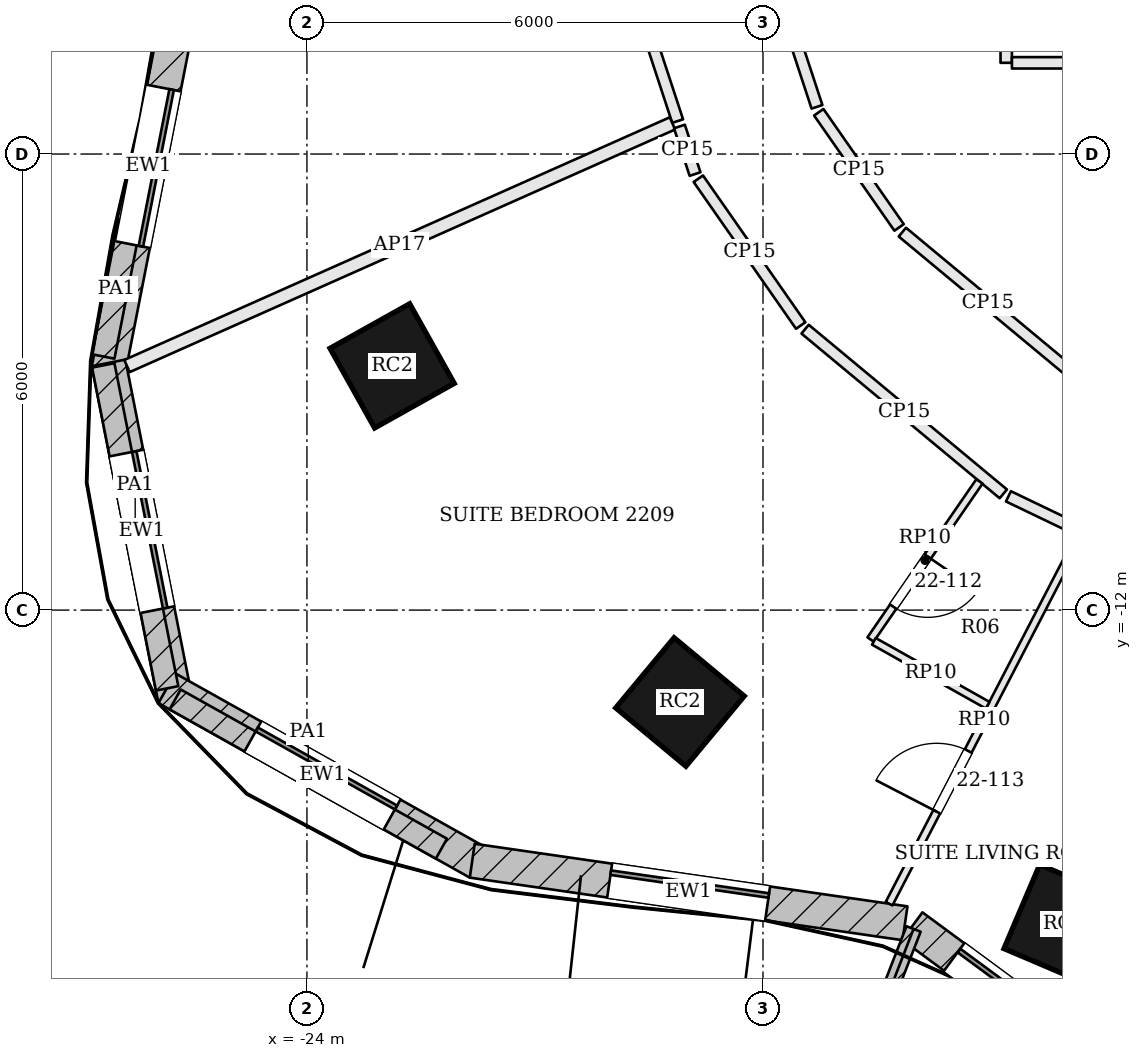
"""IFC4 building model, lengths in metres.
Left out: names, types, materials, properties, quantities, classifications, styles, units other than length and angle.
Written with IfcOpenShell. Run it as: python <this file> out.ifc"""

import sys

from ifc_helpers import new_model, si_unit, direction, frame, frame_2d, origin, origin_2d, place, context, subcontext, project, spatial, rectangle, extrude, element, fill, save


model = new_model("IFC4")
c1 = context("Model", 3, precision=1e-05, world=origin(), true_north=direction((0.0, 1.0)))
c2 = subcontext(c1, "Body", "Model", "MODEL_VIEW")
j1 = project(units=[si_unit("LENGTHUNIT", "METRE"), si_unit("PLANEANGLEUNIT", "RADIAN")], contexts=[c1])
p1 = place(None, origin())
s1 = spatial("IfcSite", under=j1, at=p1, CompositionType="ELEMENT")
p2 = place(p1, origin())
s2 = spatial("IfcBuilding", under=s1, at=p2, CompositionType="ELEMENT")
p3 = place(p2, frame((0.0, 0.0, 96.0)))
s3 = spatial("IfcBuildingStorey", under=s2, at=p3, CompositionType="ELEMENT", Elevation=96.0)
for number, where, z_axis, x_axis in (
    (1, (-22.879, -8.787, 0.0), (0.0, 0.0, 1.0), (0.489, -0.873, 0.0)),
    (2, (-19.092, -13.209, 0.0), (0.0, 0.0, 1.0), (0.769, -0.639, 0.0)),
    (3, (-14.042, -16.136, 0.0), (0.0, 0.0, 1.0), (0.92, -0.392, 0.0)),
):
    element("IfcColumn", number, at=place(p3, frame(where, z_axis=z_axis, x_axis=x_axis)), inside=s3, PredefinedType="COLUMN", context=c2, shape_type="SweptSolid", body=[
        extrude(rectangle(XDim=1.2, YDim=1.2, at=origin_2d()), origin(), (0.0, 0.0, 1.0), 3.6),
    ])
p4 = place(p3, frame((-25.561, -3.49, 0.0), z_axis=(0.0, 0.0, 1.0), x_axis=(-0.192494026297, -0.981298145234, 0.0)))
e4 = element("IfcWall", 4, at=p4, inside=s3, PredefinedType="SOLIDWALL", context=c2, shape_type="SweptSolid", body=[
    extrude(rectangle(XDim=5.446, YDim=0.45, at=frame_2d((2.723, 0.0))), origin(), (0.0, 0.0, 1.0), 3.4),
])
p5 = place(p4, frame((1.673, 0.0, 0.9)))
e5 = element("IfcOpeningElement", 5, at=p5, cuts=e4, PredefinedType="OPENING", context=c2, shape_type="SweptSolid", body=[
    extrude(rectangle(XDim=2.1, YDim=2.0, at=frame_2d((1.05, 1.0))), frame((0.0, 0.235, 0.0), z_axis=(0.0, -1.0, 0.0), x_axis=(1.0, 0.0, 0.0)), (0.0, 0.0, 1.0), 0.47),
])
p6 = place(p3, frame((-26.61, -8.748, 0.0), z_axis=(0.0, 0.0, 1.0), x_axis=(0.193923166402, -0.981016720312, 0.0)))
e6 = element("IfcWall", 6, at=p6, inside=s3, PredefinedType="SOLIDWALL", context=c2, shape_type="SweptSolid", body=[
    extrude(rectangle(XDim=4.518, YDim=0.45, at=frame_2d((2.259, 0.0))), origin(), (0.0, 0.0, 1.0), 3.4),
])
p7 = place(p6, frame((1.209, 0.0, 0.9)))
e7 = element("IfcOpeningElement", 7, at=p7, cuts=e6, PredefinedType="OPENING", context=c2, shape_type="SweptSolid", body=[
    extrude(rectangle(XDim=2.1, YDim=2.0, at=frame_2d((1.05, 1.0))), frame((0.0, 0.235, 0.0), z_axis=(0.0, -1.0, 0.0), x_axis=(1.0, 0.0, 0.0)), (0.0, 0.0, 1.0), 0.47),
])
p8 = place(p3, frame((-25.844, -13.028, 0.0), z_axis=(0.0, 0.0, 1.0), x_axis=(0.872346398261, -0.488888291373, 0.0)))
e8 = element("IfcWall", 8, at=p8, inside=s3, PredefinedType="SOLIDWALL", context=c2, shape_type="SweptSolid", body=[
    extrude(rectangle(XDim=4.696, YDim=0.45, at=frame_2d((2.348, 0.0))), origin(), (0.0, 0.0, 1.0), 3.4),
])
p9 = place(p8, frame((1.298, 0.0, 0.9)))
e9 = element("IfcOpeningElement", 9, at=p9, cuts=e8, PredefinedType="OPENING", context=c2, shape_type="SweptSolid", body=[
    extrude(rectangle(XDim=2.1, YDim=2.0, at=frame_2d((1.05, 1.0))), frame((0.0, 0.235, 0.0), z_axis=(0.0, -1.0, 0.0), x_axis=(1.0, 0.0, 0.0)), (0.0, 0.0, 1.0), 0.47),
])
p10 = place(p3, frame((-21.825, -15.297, 0.0), z_axis=(0.0, 0.0, 1.0), x_axis=(0.98971474215, -0.143054986527, 0.0)))
e10 = element("IfcWall", 10, at=p10, inside=s3, PredefinedType="SOLIDWALL", context=c2, shape_type="SweptSolid", body=[
    extrude(rectangle(XDim=5.753, YDim=0.45, at=frame_2d((2.876, 0.0))), origin(), (0.0, 0.0, 1.0), 3.4),
])
p11 = place(p10, frame((1.826, 0.0, 0.9)))
e11 = element("IfcOpeningElement", 11, at=p11, cuts=e10, PredefinedType="OPENING", context=c2, shape_type="SweptSolid", body=[
    extrude(rectangle(XDim=2.1, YDim=2.0, at=frame_2d((1.05, 1.0))), frame((0.0, 0.235, 0.0), z_axis=(0.0, -1.0, 0.0), x_axis=(1.0, 0.0, 0.0)), (0.0, 0.0, 1.0), 0.47),
])
p12 = place(p3, frame((-16.036, -16.158, 0.0), z_axis=(0.0, 0.0, 1.0), x_axis=(0.805181432967, -0.593028549064, 0.0)))
e12 = element("IfcWall", 12, at=p12, inside=s3, PredefinedType="SOLIDWALL", context=c2, shape_type="SweptSolid", body=[
    extrude(rectangle(XDim=3.469, YDim=0.45, at=frame_2d((1.734, 0.0))), origin(), (0.0, 0.0, 1.0), 3.4),
])
p13 = place(p12, frame((0.684, 0.0, 0.9)))
e13 = element("IfcOpeningElement", 13, at=p13, cuts=e12, PredefinedType="OPENING", context=c2, shape_type="SweptSolid", body=[
    extrude(rectangle(XDim=2.1, YDim=2.0, at=frame_2d((1.05, 1.0))), frame((0.0, 0.235, 0.0), z_axis=(0.0, -1.0, 0.0), x_axis=(1.0, 0.0, 0.0)), (0.0, 0.0, 1.0), 0.47),
])
p14 = place(p3, frame((-16.019, -16.195, 0.0), z_axis=(0.0, 0.0, 1.0), x_axis=(-0.362641522028, -0.931928713208, 0.0)))
e14 = element("IfcWall", 14, at=p14, inside=s3, PredefinedType="SOLIDWALL", context=c2, shape_type="SweptSolid", body=[
    extrude(rectangle(XDim=1.75, YDim=0.2, at=frame_2d((0.875, 0.0))), origin(), (0.0, 0.0, 1.0), 3.4),
])
p15 = place(p3, frame((-26.332, -6.889, 3.6), z_axis=(0.0, 0.0, 1.0), x_axis=(-0.192480725658, -0.981300754229, 0.0)))
e15 = element("IfcWall", 15, at=p15, inside=s3, PredefinedType="PARAPET", context=c2, shape_type="SweptSolid", body=[
    extrude(rectangle(XDim=1.809, YDim=0.3, at=frame_2d((0.904, 0.0))), origin(), (0.0, 0.0, 1.0), 1.1),
])
p16 = place(p3, frame((-26.68, -8.78, 3.6), z_axis=(0.0, 0.0, 1.0), x_axis=(0.193937094138, -0.981013967035, 0.0)))
e16 = element("IfcWall", 16, at=p16, inside=s3, PredefinedType="PARAPET", context=c2, shape_type="SweptSolid", body=[
    extrude(rectangle(XDim=4.332, YDim=0.3, at=frame_2d((2.166, 0.0))), origin(), (0.0, 0.0, 1.0), 1.1),
])
p17 = place(p3, frame((-25.734, -13.176, 3.6), z_axis=(0.0, 0.0, 1.0), x_axis=(0.872347343965, -0.488886603905, 0.0)))
e17 = element("IfcWall", 17, at=p17, inside=s3, PredefinedType="PARAPET", context=c2, shape_type="SweptSolid", body=[
    extrude(rectangle(XDim=4.016, YDim=0.3, at=frame_2d((2.008, 0.0))), origin(), (0.0, 0.0, 1.0), 1.1),
])
p18 = place(p3, frame((-19.914, -3.157, 0.0), z_axis=(0.0, 0.0, 1.0), x_axis=(0.312037873477, -0.950069663507, 0.0)))
e18 = element("IfcWall", 18, at=p18, inside=s3, PredefinedType="PARTITIONING", context=c2, shape_type="SweptSolid", body=[
    extrude(rectangle(XDim=2.537, YDim=0.15, at=frame_2d((1.268, 0.0))), origin(), (0.0, 0.0, 1.0), 2.784),
])
p19 = place(p3, frame((-26.367, -8.789, 0.0), z_axis=(0.0, 0.0, 1.0), x_axis=(0.913674334345, 0.406447057756, 0.0)))
e19 = element("IfcWall", 19, at=p19, inside=s3, PredefinedType="PARTITIONING", context=c2, shape_type="SweptSolid", body=[
    extrude(rectangle(XDim=7.854, YDim=0.175, at=frame_2d((3.927, 0.0))), origin(), (0.0, 0.0, 1.0), 2.784),
])
p20 = place(p3, frame((-19.099, -5.638, 0.0), z_axis=(0.0, 0.0, 1.0), x_axis=(0.312220223489, -0.950009753657, 0.0)))
e20 = element("IfcWall", 20, at=p20, inside=s3, PredefinedType="PARTITIONING", context=c2, shape_type="SweptSolid", body=[
    extrude(rectangle(XDim=0.658, YDim=0.15, at=frame_2d((0.329, 0.0))), origin(), (0.0, 0.0, 1.0), 2.784),
])
p21 = place(p3, frame((-18.851, -6.325, 0.0), z_axis=(0.0, 0.0, 1.0), x_axis=(0.572090775968, -0.820190309656, 0.0)))
e21 = element("IfcWall", 21, at=p21, inside=s3, PredefinedType="PARTITIONING", context=c2, shape_type="SweptSolid", body=[
    extrude(rectangle(XDim=2.355, YDim=0.15, at=frame_2d((1.177, 0.0))), origin(), (0.0, 0.0, 1.0), 2.784),
])
p22 = place(p3, frame((-17.446, -8.304, 0.0), z_axis=(0.0, 0.0, 1.0), x_axis=(0.769200174495, -0.639007896318, 0.0)))
e22 = element("IfcWall", 22, at=p22, inside=s3, PredefinedType="PARTITIONING", context=c2, shape_type="SweptSolid", body=[
    extrude(rectangle(XDim=3.39, YDim=0.15, at=frame_2d((1.695, 0.0))), origin(), (0.0, 0.0, 1.0), 2.784),
])
p23 = place(p3, frame((-14.771, -10.503, 0.0), z_axis=(0.0, 0.0, 1.0), x_axis=(0.901503349553, -0.432772123346, 0.0)))
e23 = element("IfcWall", 23, at=p23, inside=s3, PredefinedType="PARTITIONING", context=c2, shape_type="SweptSolid", body=[
    extrude(rectangle(XDim=3.673, YDim=0.15, at=frame_2d((1.836, 0.0))), origin(), (0.0, 0.0, 1.0), 2.784),
])
p24 = place(p23, frame((2.092, 0.0, 0.0)))
e24 = element("IfcOpeningElement", 24, at=p24, cuts=e23, PredefinedType="OPENING", context=c2, shape_type="SweptSolid", body=[
    extrude(rectangle(XDim=1.0, YDim=2.1, at=frame_2d((0.5, 1.05))), frame((0.0, 0.085, 0.0), z_axis=(0.0, -1.0, 0.0), x_axis=(1.0, 0.0, 0.0)), (0.0, 0.0, 1.0), 0.17),
])
p25 = place(p3, frame((-13.917, -8.896, 0.0), z_axis=(0.0, 0.0, 1.0), x_axis=(-0.769130409479, 0.639091866021, 0.0)))
e25 = element("IfcWall", 25, at=p25, inside=s3, PredefinedType="PARTITIONING", context=c2, shape_type="SweptSolid", body=[
    extrude(rectangle(XDim=2.925, YDim=0.15, at=frame_2d((1.462, 0.0))), origin(), (0.0, 0.0, 1.0), 2.784),
])
p26 = place(p3, frame((-16.209, -6.966, 0.0), z_axis=(0.0, 0.0, 1.0), x_axis=(-0.572051367607, 0.820217795966, 0.0)))
e26 = element("IfcWall", 26, at=p26, inside=s3, PredefinedType="PARTITIONING", context=c2, shape_type="SweptSolid", body=[
    extrude(rectangle(XDim=1.848, YDim=0.15, at=frame_2d((0.924, 0.0))), origin(), (0.0, 0.0, 1.0), 2.784),
])
p27 = place(p3, frame((-17.29, -5.379, 0.0), z_axis=(0.0, 0.0, 1.0), x_axis=(-0.312009486843, 0.950078986253, 0.0)))
e27 = element("IfcWall", 27, at=p27, inside=s3, PredefinedType="PARTITIONING", context=c2, shape_type="SweptSolid", body=[
    extrude(rectangle(XDim=2.78, YDim=0.15, at=frame_2d((1.39, 0.0))), origin(), (0.0, 0.0, 1.0), 2.784),
])
p28 = place(p3, frame((-14.8, 8.148, 0.0), z_axis=(0.0, 0.0, 1.0), x_axis=(0.0, -1.0, 0.0)))
e28 = element("IfcWall", 28, at=p28, inside=s3, PredefinedType="PARTITIONING", context=c2, shape_type="SweptSolid", body=[
    extrude(rectangle(XDim=12.948, YDim=0.15, at=frame_2d((6.474, 0.0))), origin(), (0.0, 0.0, 1.0), 2.784),
])
p29 = place(p28, frame((5.687, 0.0, 0.0)))
e29 = element("IfcOpeningElement", 29, at=p29, cuts=e28, PredefinedType="OPENING", context=c2, shape_type="SweptSolid", body=[
    extrude(rectangle(XDim=0.7, YDim=2.1, at=frame_2d((0.35, 1.05))), frame((0.0, 0.085, 0.0), z_axis=(0.0, -1.0, 0.0), x_axis=(1.0, 0.0, 0.0)), (0.0, 0.0, 1.0), 0.17),
])
p30 = place(p3, frame((-14.725, -4.8, 0.0), z_axis=(0.0, 0.0, 1.0), x_axis=(1.0, 0.0, 0.0)))
e30 = element("IfcWall", 30, at=p30, inside=s3, PredefinedType="PARTITIONING", context=c2, shape_type="SweptSolid", body=[
    extrude(rectangle(XDim=29.525, YDim=0.15, at=frame_2d((14.763, 0.0))), origin(), (0.0, 0.0, 1.0), 2.784),
])
p31 = place(p30, frame((2.075, 0.0, 0.0)))
e31 = element("IfcOpeningElement", 31, at=p31, cuts=e30, PredefinedType="OPENING", context=c2, shape_type="SweptSolid", body=[
    extrude(rectangle(XDim=1.0, YDim=2.1, at=frame_2d((0.5, 1.05))), frame((0.0, 0.085, 0.0), z_axis=(0.0, -1.0, 0.0), x_axis=(1.0, 0.0, 0.0)), (0.0, 0.0, 1.0), 0.17),
])
p32 = place(p30, frame((13.825, 0.0, 0.0)))
e32 = element("IfcOpeningElement", 32, at=p32, cuts=e30, PredefinedType="OPENING", context=c2, shape_type="SweptSolid", body=[
    extrude(rectangle(XDim=1.8, YDim=2.1, at=frame_2d((0.9, 1.05))), frame((0.0, 0.085, 0.0), z_axis=(0.0, -1.0, 0.0), x_axis=(1.0, 0.0, 0.0)), (0.0, 0.0, 1.0), 0.17),
])
p33 = place(p30, frame((26.525, 0.0, 0.0)))
e33 = element("IfcOpeningElement", 33, at=p33, cuts=e30, PredefinedType="OPENING", context=c2, shape_type="SweptSolid", body=[
    extrude(rectangle(XDim=0.7, YDim=2.1, at=frame_2d((0.35, 1.05))), frame((0.0, 0.085, 0.0), z_axis=(0.0, -1.0, 0.0), x_axis=(1.0, 0.0, 0.0)), (0.0, 0.0, 1.0), 0.17),
])
p34 = place(p3, frame((-16.341, -15.862, 0.0), z_axis=(0.0, 0.0, 1.0), x_axis=(0.460149427678, 0.887841485969, 0.0)))
e34 = element("IfcWall", 34, at=p34, inside=s3, PredefinedType="PARTITIONING", context=c2, shape_type="SweptSolid", body=[
    extrude(rectangle(XDim=5.438, YDim=0.1, at=frame_2d((2.719, 0.0))), origin(), (0.0, 0.0, 1.0), 2.884),
])
p35 = place(p34, frame((1.363, 0.0, 0.0)))
e35 = element("IfcOpeningElement", 35, at=p35, cuts=e34, PredefinedType="OPENING", context=c2, shape_type="SweptSolid", body=[
    extrude(rectangle(XDim=0.9, YDim=2.4, at=frame_2d((0.45, 1.2))), frame((0.0, 0.06, 0.0), z_axis=(0.0, -1.0, 0.0), x_axis=(1.0, 0.0, 0.0)), (0.0, 0.0, 1.0), 0.12),
])
p36 = place(p3, frame((-15.152, -10.307, 0.0), z_axis=(0.0, 0.0, 1.0), x_axis=(-0.567242581317, -0.823550759784, 0.0)))
e36 = element("IfcWall", 36, at=p36, inside=s3, PredefinedType="PARTITIONING", context=c2, shape_type="SweptSolid", body=[
    extrude(rectangle(XDim=2.525, YDim=0.1, at=frame_2d((1.263, 0.0))), origin(), (0.0, 0.0, 1.0), 2.884),
])
p37 = place(p36, frame((1.2, 0.0, 0.0)))
e37 = element("IfcOpeningElement", 37, at=p37, cuts=e36, PredefinedType="OPENING", context=c2, shape_type="SweptSolid", body=[
    extrude(rectangle(XDim=0.8, YDim=2.1, at=frame_2d((0.4, 1.05))), frame((0.0, 0.06, 0.0), z_axis=(0.0, -1.0, 0.0), x_axis=(1.0, 0.0, 0.0)), (0.0, 0.0, 1.0), 0.12),
])
p38 = place(p3, frame((-16.541, -12.411, 0.0), z_axis=(0.0, 0.0, 1.0), x_axis=(0.872042364088, -0.489430398765, 0.0)))
e38 = element("IfcWall", 38, at=p38, inside=s3, PredefinedType="PARTITIONING", context=c2, shape_type="SweptSolid", body=[
    extrude(rectangle(XDim=1.717, YDim=0.1, at=frame_2d((0.858, 0.0))), origin(), (0.0, 0.0, 1.0), 2.884),
])
p39 = place(p5, origin())
e39 = element("IfcWindow", 39, at=p39, inside=s3, PartitioningType="SINGLE_PANEL", PredefinedType="WINDOW", context=c2, shape_type="SweptSolid", body=[
    extrude(rectangle(XDim=2.1, YDim=2.0, at=frame_2d((1.05, 1.0))), frame((0.0, 0.135, 0.0), z_axis=(0.0, -1.0, 0.0), x_axis=(1.0, 0.0, 0.0)), (0.0, 0.0, 1.0), 0.06),
])
fill(e5, e39)
p40 = place(p7, origin())
e40 = element("IfcWindow", 40, at=p40, inside=s3, PartitioningType="SINGLE_PANEL", PredefinedType="WINDOW", context=c2, shape_type="SweptSolid", body=[
    extrude(rectangle(XDim=2.1, YDim=2.0, at=frame_2d((1.05, 1.0))), frame((0.0, 0.135, 0.0), z_axis=(0.0, -1.0, 0.0), x_axis=(1.0, 0.0, 0.0)), (0.0, 0.0, 1.0), 0.06),
])
fill(e7, e40)
p41 = place(p9, origin())
e41 = element("IfcWindow", 41, at=p41, inside=s3, PartitioningType="SINGLE_PANEL", PredefinedType="WINDOW", context=c2, shape_type="SweptSolid", body=[
    extrude(rectangle(XDim=2.1, YDim=2.0, at=frame_2d((1.05, 1.0))), frame((0.0, 0.135, 0.0), z_axis=(0.0, -1.0, 0.0), x_axis=(1.0, 0.0, 0.0)), (0.0, 0.0, 1.0), 0.06),
])
fill(e9, e41)
p42 = place(p11, origin())
e42 = element("IfcWindow", 42, at=p42, inside=s3, PartitioningType="SINGLE_PANEL", PredefinedType="WINDOW", context=c2, shape_type="SweptSolid", body=[
    extrude(rectangle(XDim=2.1, YDim=2.0, at=frame_2d((1.05, 1.0))), frame((0.0, 0.135, 0.0), z_axis=(0.0, -1.0, 0.0), x_axis=(1.0, 0.0, 0.0)), (0.0, 0.0, 1.0), 0.06),
])
fill(e11, e42)
p43 = place(p13, origin())
e43 = element("IfcWindow", 43, at=p43, inside=s3, PartitioningType="SINGLE_PANEL", PredefinedType="WINDOW", context=c2, shape_type="SweptSolid", body=[
    extrude(rectangle(XDim=2.1, YDim=2.0, at=frame_2d((1.05, 1.0))), frame((0.0, 0.135, 0.0), z_axis=(0.0, -1.0, 0.0), x_axis=(1.0, 0.0, 0.0)), (0.0, 0.0, 1.0), 0.06),
])
fill(e13, e43)
p44 = place(p37, origin())
e44 = element("IfcDoor", 44, at=p44, inside=s3, OperationType="SINGLE_SWING_LEFT", PredefinedType="DOOR", context=c2, shape_type="SweptSolid", body=[
    extrude(rectangle(XDim=0.8, YDim=2.1, at=frame_2d((0.4, 1.05))), frame((0.0, 0.025, 0.0), z_axis=(0.0, -1.0, 0.0), x_axis=(1.0, 0.0, 0.0)), (0.0, 0.0, 1.0), 0.05),
])
fill(e37, e44)
p45 = place(p35, origin())
e45 = element("IfcDoor", 45, at=p45, inside=s3, OperationType="SINGLE_SWING_LEFT", PredefinedType="DOOR", context=c2, shape_type="SweptSolid", body=[
    extrude(rectangle(XDim=0.9, YDim=2.4, at=frame_2d((0.45, 1.2))), frame((0.0, 0.025, 0.0), z_axis=(0.0, -1.0, 0.0), x_axis=(1.0, 0.0, 0.0)), (0.0, 0.0, 1.0), 0.05),
])
fill(e35, e45)
save(model, sys.argv[1])
